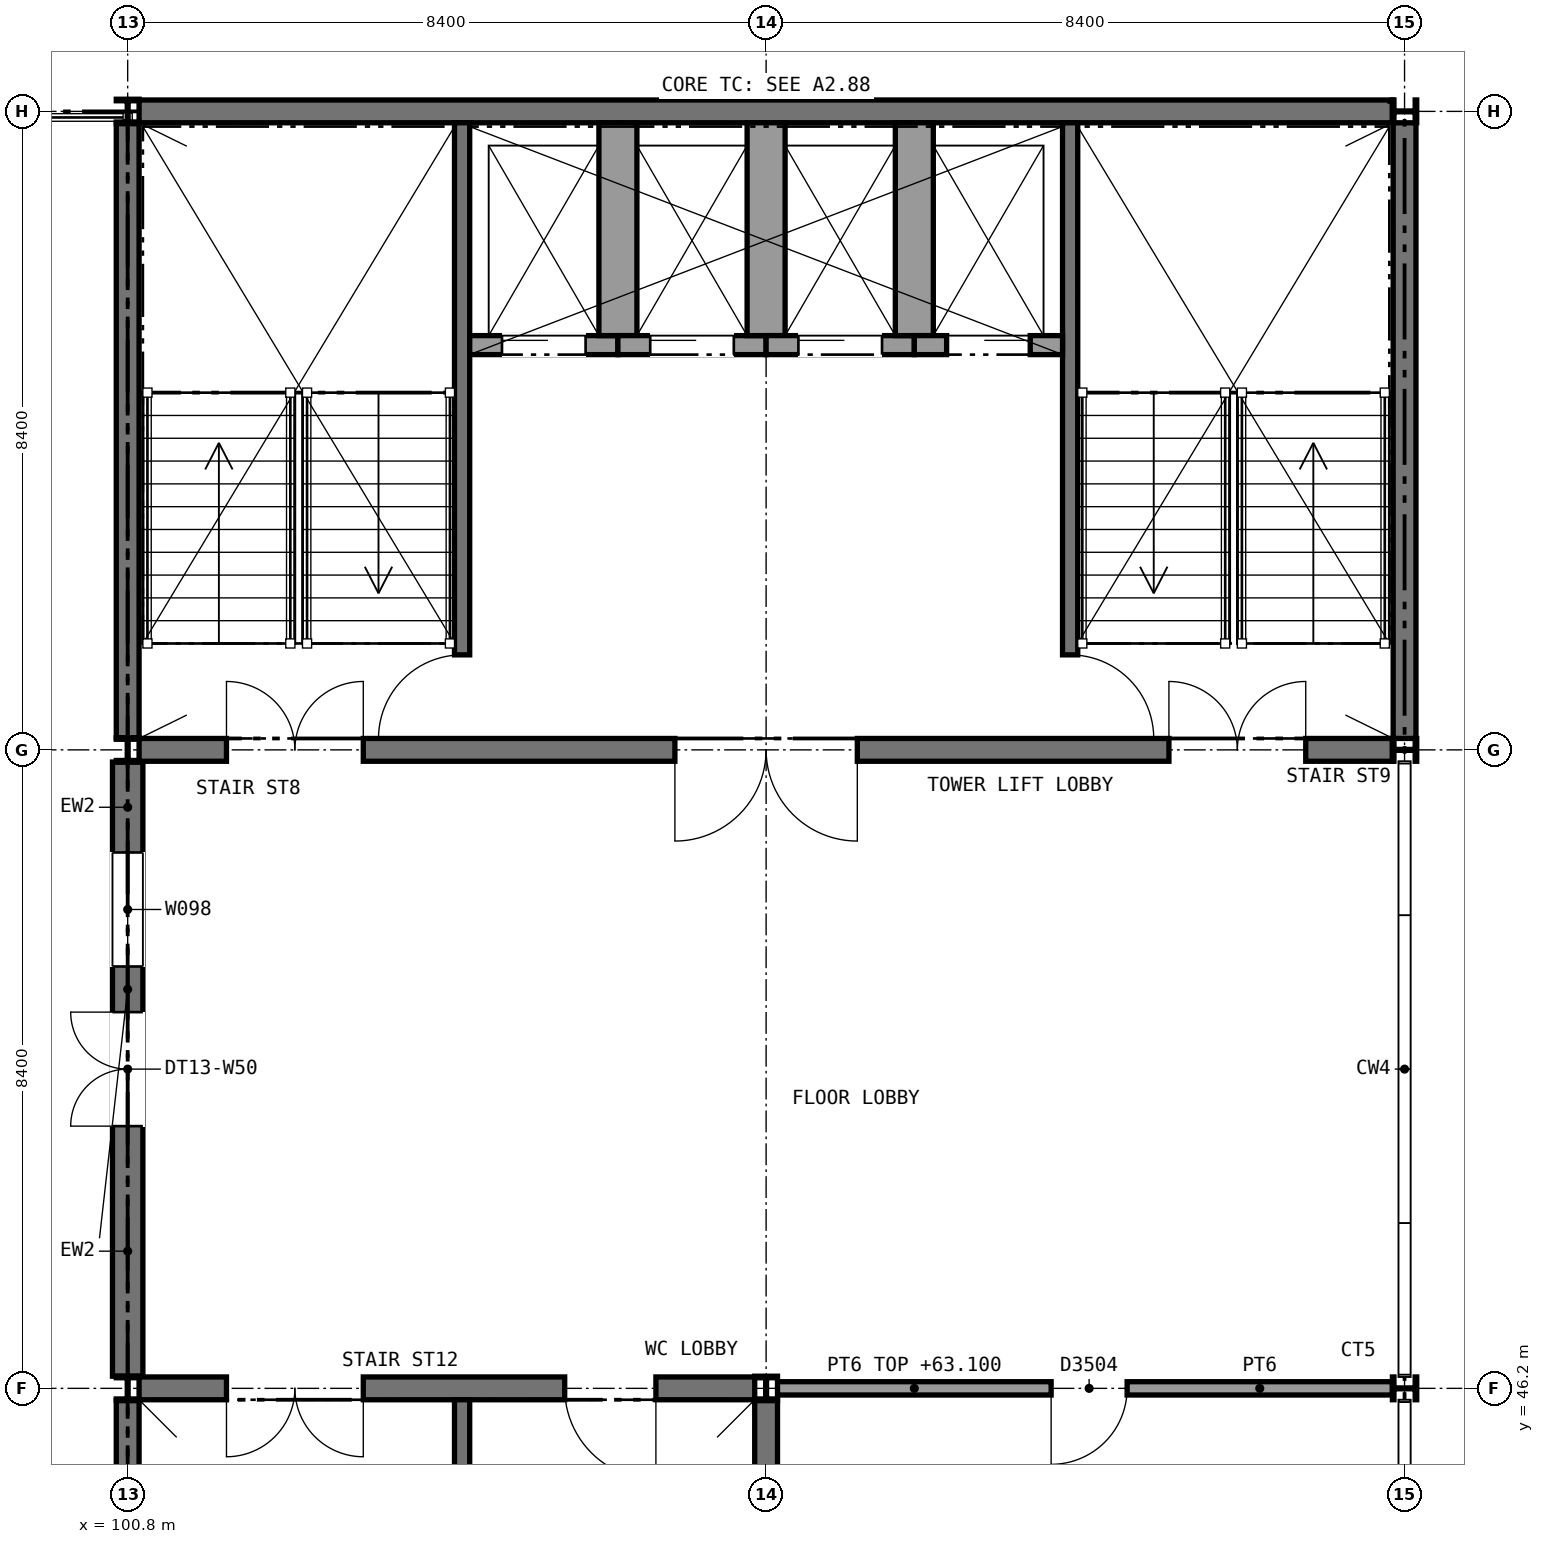
"""IFC4 building model, lengths in metres.
Left out: names, types, materials, properties, quantities, classifications, styles, units other than length and angle.
Written with IfcOpenShell. Run it as: python <this file> out.ifc"""

import sys

from ifc_helpers import new_model, si_unit, direction, frame, frame_2d, origin, origin_2d, place, context, subcontext, project, spatial, rectangle, i_section, extrude, element, fill, save


model = new_model("IFC4")
c1 = context("Model", 3, precision=1e-05, world=origin(), true_north=direction((0.0, 1.0)))
c2 = subcontext(c1, "Body", "Model", "MODEL_VIEW")
j1 = project(units=[si_unit("LENGTHUNIT", "METRE"), si_unit("PLANEANGLEUNIT", "RADIAN")], contexts=[c1])
p1 = place(None, origin())
s1 = spatial("IfcSite", under=j1, at=p1, CompositionType="ELEMENT")
p2 = place(p1, origin())
s2 = spatial("IfcBuilding", under=s1, at=p2, CompositionType="ELEMENT")
p3 = place(p2, frame((0.0, 0.0, 59.6)))
s3 = spatial("IfcBuildingStorey", under=s2, at=p3, CompositionType="ELEMENT", Elevation=59.6)
p4 = place(p3, frame((100.95, 63.0, 0.0), z_axis=(0.0, 0.0, 1.0), x_axis=(1.0, 0.0, 0.0)))
e1 = element("IfcWall", 1, at=p4, inside=s3, PredefinedType="SHEAR", context=c2, shape_type="SweptSolid", body=[
    extrude(rectangle(XDim=16.49, YDim=0.3, at=frame_2d((8.245, 0.0))), origin(), (0.0, 0.0, 1.0), 3.85),
])
p5 = place(p3, frame((100.95, 54.6, 0.0), z_axis=(0.0, 0.0, 1.0), x_axis=(1.0, 0.0, 0.0)))
e2 = element("IfcWall", 2, at=p5, inside=s3, PredefinedType="SHEAR", context=c2, shape_type="SweptSolid", body=[
    extrude(rectangle(XDim=16.49, YDim=0.3, at=frame_2d((8.245, 0.0))), origin(), (0.0, 0.0, 1.0), 3.85),
])
p6 = place(p5, frame((1.15, 0.0, 0.0)))
e3 = element("IfcOpeningElement", 3, at=p6, cuts=e2, PredefinedType="OPENING", context=c2, shape_type="SweptSolid", body=[
    extrude(rectangle(XDim=1.8, YDim=2.1, at=frame_2d((0.9, 1.05))), frame((0.0, 0.16, 0.0), z_axis=(0.0, -1.0, 0.0), x_axis=(1.0, 0.0, 0.0)), (0.0, 0.0, 1.0), 0.32),
])
p7 = place(p5, frame((13.55, 0.0, 0.0)))
e4 = element("IfcOpeningElement", 4, at=p7, cuts=e2, PredefinedType="OPENING", context=c2, shape_type="SweptSolid", body=[
    extrude(rectangle(XDim=1.8, YDim=2.1, at=frame_2d((0.9, 1.05))), frame((0.0, 0.16, 0.0), z_axis=(0.0, -1.0, 0.0), x_axis=(1.0, 0.0, 0.0)), (0.0, 0.0, 1.0), 0.32),
])
p8 = place(p5, frame((7.05, 0.0, 0.0)))
e5 = element("IfcOpeningElement", 5, at=p8, cuts=e2, PredefinedType="OPENING", context=c2, shape_type="SweptSolid", body=[
    extrude(rectangle(XDim=2.4, YDim=2.4, at=frame_2d((1.2, 1.2))), frame((0.0, 0.16, 0.0), z_axis=(0.0, -1.0, 0.0), x_axis=(1.0, 0.0, 0.0)), (0.0, 0.0, 1.0), 0.32),
])
p9 = place(p3, frame((100.8, 54.76, 0.0), z_axis=(0.0, 0.0, 1.0), x_axis=(0.0, 1.0, 0.0)))
e6 = element("IfcWall", 6, at=p9, inside=s3, PredefinedType="SHEAR", context=c2, shape_type="SweptSolid", body=[
    extrude(rectangle(XDim=8.08, YDim=0.3, at=frame_2d((4.04, 0.0))), origin(), (0.0, 0.0, 1.0), 3.85),
])
p10 = place(p3, frame((117.6, 54.75, 0.0), z_axis=(0.0, 0.0, 1.0), x_axis=(0.0, 1.0, 0.0)))
e7 = element("IfcWall", 7, at=p10, inside=s3, PredefinedType="SHEAR", context=c2, shape_type="SweptSolid", body=[
    extrude(rectangle(XDim=8.1, YDim=0.3, at=frame_2d((4.05, 0.0))), origin(), (0.0, 0.0, 1.0), 3.85),
])
p11 = place(p3, frame((100.95, 46.2, 0.0), z_axis=(0.0, 0.0, 1.0), x_axis=(1.0, 0.0, 0.0)))
e8 = element("IfcWall", 8, at=p11, inside=s3, PredefinedType="SHEAR", context=c2, shape_type="SweptSolid", body=[
    extrude(rectangle(XDim=8.1, YDim=0.3, at=frame_2d((4.05, 0.0))), origin(), (0.0, 0.0, 1.0), 3.85),
])
p12 = place(p11, frame((1.15, 0.0, 0.0)))
e9 = element("IfcOpeningElement", 9, at=p12, cuts=e8, PredefinedType="OPENING", context=c2, shape_type="SweptSolid", body=[
    extrude(rectangle(XDim=1.8, YDim=2.1, at=frame_2d((0.9, 1.05))), frame((0.0, 0.16, 0.0), z_axis=(0.0, -1.0, 0.0), x_axis=(1.0, 0.0, 0.0)), (0.0, 0.0, 1.0), 0.32),
])
p13 = place(p11, frame((5.6, 0.0, 0.0)))
e10 = element("IfcOpeningElement", 10, at=p13, cuts=e8, PredefinedType="OPENING", context=c2, shape_type="SweptSolid", body=[
    extrude(rectangle(XDim=1.2, YDim=2.1, at=frame_2d((0.6, 1.05))), frame((0.0, 0.16, 0.0), z_axis=(0.0, -1.0, 0.0), x_axis=(1.0, 0.0, 0.0)), (0.0, 0.0, 1.0), 0.32),
])
for number, where, z_axis, x_axis in (
    (11, (100.8, 37.96, 0.0), (0.0, 0.0, 1.0), (0.0, 1.0, 0.0)),
    (12, (109.2, 37.96, 0.0), (0.0, 0.0, 1.0), (0.0, 1.0, 0.0)),
):
    element("IfcWall", number, at=place(p3, frame(where, z_axis=z_axis, x_axis=x_axis)), inside=s3, PredefinedType="SHEAR", context=c2, shape_type="SweptSolid", body=[
        extrude(rectangle(XDim=8.08, YDim=0.3, at=frame_2d((4.04, 0.0))), origin(), (0.0, 0.0, 1.0), 3.85),
    ])
for number, where, z_axis, x_axis in (
    (13, (100.8, 46.2, 0.0), (0.0, 0.0, 1.0), (1.0, 0.0, 0.0)),
    (14, (100.8, 54.6, 0.0), (0.0, 0.0, 1.0), (1.0, 0.0, 0.0)),
    (15, (100.8, 63.0, 0.0), (0.0, 0.0, 1.0), (1.0, 0.0, 0.0)),
    (16, (109.2, 46.2, 0.0), (0.0, 0.0, 1.0), (1.0, 0.0, 0.0)),
    (17, (117.6, 46.2, 0.0), (0.0, 0.0, 1.0), (0.0, 1.0, 0.0)),
    (18, (117.6, 54.6, 0.0), (0.0, 0.0, 1.0), (0.0, 1.0, 0.0)),
    (19, (117.6, 63.0, 0.0), (0.0, 0.0, 1.0), (0.0, 1.0, 0.0)),
):
    element("IfcColumn", number, at=place(p3, frame(where, z_axis=z_axis, x_axis=x_axis)), inside=s3, PredefinedType="COLUMN", context=c2, shape_type="SweptSolid", body=[
        extrude(i_section(OverallWidth=0.3, OverallDepth=0.32, WebThickness=0.011, FlangeThickness=0.021, FilletRadius=0.027, at=origin_2d()), origin(), (0.0, 0.0, 1.0), 4.0),
    ])
p14 = place(p3, frame((109.35, 46.2, 0.0), z_axis=(0.0, 0.0, 1.0), x_axis=(1.0, 0.0, 0.0)))
e20 = element("IfcWall", 20, at=p14, inside=s3, PredefinedType="PARTITIONING", context=c2, shape_type="SweptSolid", body=[
    extrude(rectangle(XDim=8.09, YDim=0.175, at=frame_2d((4.045, 0.0))), origin(), (0.0, 0.0, 1.0), 3.5),
])
p15 = place(p14, frame((3.6, 0.0, 0.0)))
e21 = element("IfcOpeningElement", 21, at=p15, cuts=e20, PredefinedType="OPENING", context=c2, shape_type="SweptSolid", body=[
    extrude(rectangle(XDim=1.0, YDim=2.1, at=frame_2d((0.5, 1.05))), frame((0.0, 0.098, 0.0), z_axis=(0.0, -1.0, 0.0), x_axis=(1.0, 0.0, 0.0)), (0.0, 0.0, 1.0), 0.195),
])
p16 = place(p3, frame((100.8, 46.36, 0.0), z_axis=(0.0, 0.0, 1.0), x_axis=(0.0, 1.0, 0.0)))
e22 = element("IfcWall", 22, at=p16, inside=s3, PredefinedType="STANDARD", context=c2, shape_type="SweptSolid", body=[
    extrude(rectangle(XDim=8.08, YDim=0.4, at=frame_2d((4.04, 0.0))), origin(), (0.0, 0.0, 1.0), 3.85),
])
p17 = place(p16, frame((5.39, 0.0, 0.9)))
e23 = element("IfcOpeningElement", 23, at=p17, cuts=e22, PredefinedType="OPENING", context=c2, shape_type="SweptSolid", body=[
    extrude(rectangle(XDim=1.5, YDim=2.1, at=frame_2d((0.75, 1.05))), frame((0.0, 0.21, 0.0), z_axis=(0.0, -1.0, 0.0), x_axis=(1.0, 0.0, 0.0)), (0.0, 0.0, 1.0), 0.42),
])
p18 = place(p16, frame((3.29, 0.0, 0.0)))
e24 = element("IfcOpeningElement", 24, at=p18, cuts=e22, PredefinedType="OPENING", context=c2, shape_type="SweptSolid", body=[
    extrude(rectangle(XDim=1.5, YDim=2.4, at=frame_2d((0.75, 1.2))), frame((0.0, 0.21, 0.0), z_axis=(0.0, -1.0, 0.0), x_axis=(1.0, 0.0, 0.0)), (0.0, 0.0, 1.0), 0.42),
])
p19 = place(p3, frame((105.2, 62.85, 0.0), z_axis=(0.0, 0.0, 1.0), x_axis=(0.0, -1.0, 0.0)))
e25 = element("IfcWall", 25, at=p19, inside=s3, PredefinedType="SHEAR", context=c2, shape_type="SweptSolid", body=[
    extrude(rectangle(XDim=8.1, YDim=0.2, at=frame_2d((4.05, 0.0))), origin(), (0.0, 0.0, 1.0), 3.85),
])
p20 = place(p19, frame((7.0, 0.0, 0.0)))
e26 = element("IfcOpeningElement", 26, at=p20, cuts=e25, PredefinedType="OPENING", context=c2, shape_type="SweptSolid", body=[
    extrude(rectangle(XDim=1.11, YDim=2.1, at=frame_2d((0.555, 1.05))), frame((0.0, 0.11, 0.0), z_axis=(0.0, -1.0, 0.0), x_axis=(1.0, 0.0, 0.0)), (0.0, 0.0, 1.0), 0.22),
])
p21 = place(p3, frame((113.2, 62.85, 0.0), z_axis=(0.0, 0.0, 1.0), x_axis=(0.0, -1.0, 0.0)))
e27 = element("IfcWall", 27, at=p21, inside=s3, PredefinedType="SHEAR", context=c2, shape_type="SweptSolid", body=[
    extrude(rectangle(XDim=8.1, YDim=0.2, at=frame_2d((4.05, 0.0))), origin(), (0.0, 0.0, 1.0), 3.85),
])
p22 = place(p21, frame((7.0, 0.0, 0.0)))
e28 = element("IfcOpeningElement", 28, at=p22, cuts=e27, PredefinedType="OPENING", context=c2, shape_type="SweptSolid", body=[
    extrude(rectangle(XDim=1.11, YDim=2.1, at=frame_2d((0.555, 1.05))), frame((0.0, 0.11, 0.0), z_axis=(0.0, -1.0, 0.0), x_axis=(1.0, 0.0, 0.0)), (0.0, 0.0, 1.0), 0.22),
])
p23 = place(p3, frame((105.3, 59.925, 0.0), z_axis=(0.0, 0.0, 1.0), x_axis=(1.0, 0.0, 0.0)))
e29 = element("IfcWall", 29, at=p23, inside=s3, PredefinedType="SOLIDWALL", context=c2, shape_type="SweptSolid", body=[
    extrude(rectangle(XDim=1.95, YDim=0.25, at=frame_2d((0.975, 0.0))), origin(), (0.0, 0.0, 1.0), 4.0),
])
p24 = place(p23, frame((0.425, 0.0, 0.0)))
e30 = element("IfcOpeningElement", 30, at=p24, cuts=e29, PredefinedType="OPENING", context=c2, shape_type="SweptSolid", body=[
    extrude(rectangle(XDim=1.1, YDim=2.1, at=frame_2d((0.55, 1.05))), frame((0.0, 0.135, 0.0), z_axis=(0.0, -1.0, 0.0), x_axis=(1.0, 0.0, 0.0)), (0.0, 0.0, 1.0), 0.27),
])
p25 = place(p3, frame((107.25, 62.85, 0.0), z_axis=(0.0, 0.0, 1.0), x_axis=(0.0, -1.0, 0.0)))
e31 = element("IfcWall", 31, at=p25, inside=s3, PredefinedType="SOLIDWALL", context=c2, shape_type="SweptSolid", body=[
    extrude(rectangle(XDim=2.8, YDim=0.5, at=frame_2d((1.4, 0.0))), origin(), (0.0, 0.0, 1.0), 4.0),
])
p26 = place(p3, frame((107.25, 59.925, 0.0), z_axis=(0.0, 0.0, 1.0), x_axis=(1.0, 0.0, 0.0)))
e32 = element("IfcWall", 32, at=p26, inside=s3, PredefinedType="SOLIDWALL", context=c2, shape_type="SweptSolid", body=[
    extrude(rectangle(XDim=1.95, YDim=0.25, at=frame_2d((0.975, 0.0))), origin(), (0.0, 0.0, 1.0), 4.0),
])
p27 = place(p26, frame((0.425, 0.0, 0.0)))
e33 = element("IfcOpeningElement", 33, at=p27, cuts=e32, PredefinedType="OPENING", context=c2, shape_type="SweptSolid", body=[
    extrude(rectangle(XDim=1.1, YDim=2.1, at=frame_2d((0.55, 1.05))), frame((0.0, 0.135, 0.0), z_axis=(0.0, -1.0, 0.0), x_axis=(1.0, 0.0, 0.0)), (0.0, 0.0, 1.0), 0.27),
])
p28 = place(p3, frame((109.2, 62.85, 0.0), z_axis=(0.0, 0.0, 1.0), x_axis=(0.0, -1.0, 0.0)))
e34 = element("IfcWall", 34, at=p28, inside=s3, PredefinedType="SOLIDWALL", context=c2, shape_type="SweptSolid", body=[
    extrude(rectangle(XDim=2.8, YDim=0.5, at=frame_2d((1.4, 0.0))), origin(), (0.0, 0.0, 1.0), 4.0),
])
p29 = place(p3, frame((109.2, 59.925, 0.0), z_axis=(0.0, 0.0, 1.0), x_axis=(1.0, 0.0, 0.0)))
e35 = element("IfcWall", 35, at=p29, inside=s3, PredefinedType="SOLIDWALL", context=c2, shape_type="SweptSolid", body=[
    extrude(rectangle(XDim=1.95, YDim=0.25, at=frame_2d((0.975, 0.0))), origin(), (0.0, 0.0, 1.0), 4.0),
])
p30 = place(p29, frame((0.425, 0.0, 0.0)))
e36 = element("IfcOpeningElement", 36, at=p30, cuts=e35, PredefinedType="OPENING", context=c2, shape_type="SweptSolid", body=[
    extrude(rectangle(XDim=1.1, YDim=2.1, at=frame_2d((0.55, 1.05))), frame((0.0, 0.135, 0.0), z_axis=(0.0, -1.0, 0.0), x_axis=(1.0, 0.0, 0.0)), (0.0, 0.0, 1.0), 0.27),
])
p31 = place(p3, frame((111.15, 62.85, 0.0), z_axis=(0.0, 0.0, 1.0), x_axis=(0.0, -1.0, 0.0)))
e37 = element("IfcWall", 37, at=p31, inside=s3, PredefinedType="SOLIDWALL", context=c2, shape_type="SweptSolid", body=[
    extrude(rectangle(XDim=2.8, YDim=0.5, at=frame_2d((1.4, 0.0))), origin(), (0.0, 0.0, 1.0), 4.0),
])
p32 = place(p3, frame((111.15, 59.925, 0.0), z_axis=(0.0, 0.0, 1.0), x_axis=(1.0, 0.0, 0.0)))
e38 = element("IfcWall", 38, at=p32, inside=s3, PredefinedType="SOLIDWALL", context=c2, shape_type="SweptSolid", body=[
    extrude(rectangle(XDim=1.95, YDim=0.25, at=frame_2d((0.975, 0.0))), origin(), (0.0, 0.0, 1.0), 4.0),
])
p33 = place(p32, frame((0.425, 0.0, 0.0)))
e39 = element("IfcOpeningElement", 39, at=p33, cuts=e38, PredefinedType="OPENING", context=c2, shape_type="SweptSolid", body=[
    extrude(rectangle(XDim=1.1, YDim=2.1, at=frame_2d((0.55, 1.05))), frame((0.0, 0.135, 0.0), z_axis=(0.0, -1.0, 0.0), x_axis=(1.0, 0.0, 0.0)), (0.0, 0.0, 1.0), 0.27),
])
p34 = place(p3, frame((105.2, 37.95, 0.0), z_axis=(0.0, 0.0, 1.0), x_axis=(0.0, 1.0, 0.0)))
e40 = element("IfcWall", 40, at=p34, inside=s3, PredefinedType="SHEAR", context=c2, shape_type="SweptSolid", body=[
    extrude(rectangle(XDim=8.1, YDim=0.2, at=frame_2d((4.05, 0.0))), origin(), (0.0, 0.0, 1.0), 3.85),
])
p35 = place(p15, frame((1.0, 0.0, 0.0), z_axis=(0.0, 0.0, 1.0), x_axis=(-1.0, 0.0, 0.0)))
e41 = element("IfcDoor", 41, at=p35, inside=s3, OperationType="SINGLE_SWING_RIGHT", PredefinedType="DOOR", context=c2, shape_type="SweptSolid", body=[
    extrude(rectangle(XDim=1.0, YDim=2.1, at=frame_2d((0.5, 1.05))), frame((0.0, 0.025, 0.0), z_axis=(0.0, -1.0, 0.0), x_axis=(1.0, 0.0, 0.0)), (0.0, 0.0, 1.0), 0.05),
])
fill(e21, e41)
p36 = place(p17, origin())
e42 = element("IfcWindow", 42, at=p36, inside=s3, PartitioningType="SINGLE_PANEL", PredefinedType="WINDOW", context=c2, shape_type="SweptSolid", body=[
    extrude(rectangle(XDim=1.5, YDim=2.1, at=frame_2d((0.75, 1.05))), frame((0.0, 0.03, 0.0), z_axis=(0.0, -1.0, 0.0), x_axis=(1.0, 0.0, 0.0)), (0.0, 0.0, 1.0), 0.06),
])
fill(e23, e42)
p37 = place(p18, origin())
e43 = element("IfcDoor", 43, at=p37, inside=s3, OperationType="DOUBLE_DOOR_SINGLE_SWING", PredefinedType="DOOR", context=c2, shape_type="SweptSolid", body=[
    extrude(rectangle(XDim=1.5, YDim=2.4, at=frame_2d((0.75, 1.2))), frame((0.0, 0.025, 0.0), z_axis=(0.0, -1.0, 0.0), x_axis=(1.0, 0.0, 0.0)), (0.0, 0.0, 1.0), 0.05),
])
fill(e24, e43)
p38 = place(p20, frame((1.1, 0.0, 0.0), z_axis=(0.0, 0.0, 1.0), x_axis=(-1.0, 0.0, 0.0)))
e44 = element("IfcDoor", 44, at=p38, inside=s3, OperationType="SINGLE_SWING_LEFT", PredefinedType="DOOR", context=c2, shape_type="SweptSolid", body=[
    extrude(rectangle(XDim=1.1, YDim=2.1, at=frame_2d((0.55, 1.05))), frame((0.0, 0.025, 0.0), z_axis=(0.0, -1.0, 0.0), x_axis=(1.0, 0.0, 0.0)), (0.0, 0.0, 1.0), 0.05),
])
fill(e26, e44)
p39 = place(p22, origin())
e45 = element("IfcDoor", 45, at=p39, inside=s3, OperationType="SINGLE_SWING_RIGHT", PredefinedType="DOOR", context=c2, shape_type="SweptSolid", body=[
    extrude(rectangle(XDim=1.1, YDim=2.1, at=frame_2d((0.55, 1.05))), frame((0.0, 0.025, 0.0), z_axis=(0.0, -1.0, 0.0), x_axis=(1.0, 0.0, 0.0)), (0.0, 0.0, 1.0), 0.05),
])
fill(e28, e45)
p40 = place(p24, frame((1.1, 0.0, 0.0), z_axis=(0.0, 0.0, 1.0), x_axis=(-1.0, 0.0, 0.0)))
e46 = element("IfcDoor", 46, at=p40, inside=s3, OperationType="SLIDING_TO_RIGHT", PredefinedType="DOOR", context=c2, shape_type="SweptSolid", body=[
    extrude(rectangle(XDim=1.1, YDim=2.1, at=frame_2d((0.55, 1.05))), frame((0.0, 0.025, 0.0), z_axis=(0.0, -1.0, 0.0), x_axis=(1.0, 0.0, 0.0)), (0.0, 0.0, 1.0), 0.05),
])
fill(e30, e46)
p41 = place(p27, frame((1.1, 0.0, 0.0), z_axis=(0.0, 0.0, 1.0), x_axis=(-1.0, 0.0, 0.0)))
e47 = element("IfcDoor", 47, at=p41, inside=s3, OperationType="SLIDING_TO_RIGHT", PredefinedType="DOOR", context=c2, shape_type="SweptSolid", body=[
    extrude(rectangle(XDim=1.1, YDim=2.1, at=frame_2d((0.55, 1.05))), frame((0.0, 0.025, 0.0), z_axis=(0.0, -1.0, 0.0), x_axis=(1.0, 0.0, 0.0)), (0.0, 0.0, 1.0), 0.05),
])
fill(e33, e47)
p42 = place(p30, frame((1.1, 0.0, 0.0), z_axis=(0.0, 0.0, 1.0), x_axis=(-1.0, 0.0, 0.0)))
e48 = element("IfcDoor", 48, at=p42, inside=s3, OperationType="SLIDING_TO_RIGHT", PredefinedType="DOOR", context=c2, shape_type="SweptSolid", body=[
    extrude(rectangle(XDim=1.1, YDim=2.1, at=frame_2d((0.55, 1.05))), frame((0.0, 0.025, 0.0), z_axis=(0.0, -1.0, 0.0), x_axis=(1.0, 0.0, 0.0)), (0.0, 0.0, 1.0), 0.05),
])
fill(e36, e48)
p43 = place(p33, frame((1.1, 0.0, 0.0), z_axis=(0.0, 0.0, 1.0), x_axis=(-1.0, 0.0, 0.0)))
e49 = element("IfcDoor", 49, at=p43, inside=s3, OperationType="SLIDING_TO_LEFT", PredefinedType="DOOR", context=c2, shape_type="SweptSolid", body=[
    extrude(rectangle(XDim=1.1, YDim=2.1, at=frame_2d((0.55, 1.05))), frame((0.0, 0.025, 0.0), z_axis=(0.0, -1.0, 0.0), x_axis=(1.0, 0.0, 0.0)), (0.0, 0.0, 1.0), 0.05),
])
fill(e39, e49)
p44 = place(p6, origin())
e50 = element("IfcDoor", 50, at=p44, inside=s3, OperationType="DOUBLE_DOOR_SINGLE_SWING", PredefinedType="DOOR", context=c2, shape_type="SweptSolid", body=[
    extrude(rectangle(XDim=1.8, YDim=2.1, at=frame_2d((0.9, 1.05))), frame((0.0, 0.025, 0.0), z_axis=(0.0, -1.0, 0.0), x_axis=(1.0, 0.0, 0.0)), (0.0, 0.0, 1.0), 0.05),
])
fill(e3, e50)
p45 = place(p7, origin())
e51 = element("IfcDoor", 51, at=p45, inside=s3, OperationType="DOUBLE_DOOR_SINGLE_SWING", PredefinedType="DOOR", context=c2, shape_type="SweptSolid", body=[
    extrude(rectangle(XDim=1.8, YDim=2.1, at=frame_2d((0.9, 1.05))), frame((0.0, 0.025, 0.0), z_axis=(0.0, -1.0, 0.0), x_axis=(1.0, 0.0, 0.0)), (0.0, 0.0, 1.0), 0.05),
])
fill(e4, e51)
p46 = place(p8, frame((2.4, 0.0, 0.0), z_axis=(0.0, 0.0, 1.0), x_axis=(-1.0, 0.0, 0.0)))
e52 = element("IfcDoor", 52, at=p46, inside=s3, OperationType="DOUBLE_DOOR_SINGLE_SWING", PredefinedType="DOOR", context=c2, shape_type="SweptSolid", body=[
    extrude(rectangle(XDim=2.4, YDim=2.4, at=frame_2d((1.2, 1.2))), frame((0.0, 0.025, 0.0), z_axis=(0.0, -1.0, 0.0), x_axis=(1.0, 0.0, 0.0)), (0.0, 0.0, 1.0), 0.05),
])
fill(e5, e52)
p47 = place(p12, frame((1.8, 0.0, 0.0), z_axis=(0.0, 0.0, 1.0), x_axis=(-1.0, 0.0, 0.0)))
e53 = element("IfcDoor", 53, at=p47, inside=s3, OperationType="DOUBLE_DOOR_SINGLE_SWING", PredefinedType="DOOR", context=c2, shape_type="SweptSolid", body=[
    extrude(rectangle(XDim=1.8, YDim=2.1, at=frame_2d((0.9, 1.05))), frame((0.0, 0.025, 0.0), z_axis=(0.0, -1.0, 0.0), x_axis=(1.0, 0.0, 0.0)), (0.0, 0.0, 1.0), 0.05),
])
fill(e9, e53)
p48 = place(p13, frame((1.2, 0.0, 0.0), z_axis=(0.0, 0.0, 1.0), x_axis=(-1.0, 0.0, 0.0)))
e54 = element("IfcDoor", 54, at=p48, inside=s3, OperationType="SINGLE_SWING_LEFT", PredefinedType="DOOR", context=c2, shape_type="SweptSolid", body=[
    extrude(rectangle(XDim=1.2, YDim=2.1, at=frame_2d((0.6, 1.05))), frame((0.0, 0.025, 0.0), z_axis=(0.0, -1.0, 0.0), x_axis=(1.0, 0.0, 0.0)), (0.0, 0.0, 1.0), 0.05),
])
fill(e10, e54)
save(model, sys.argv[1])
